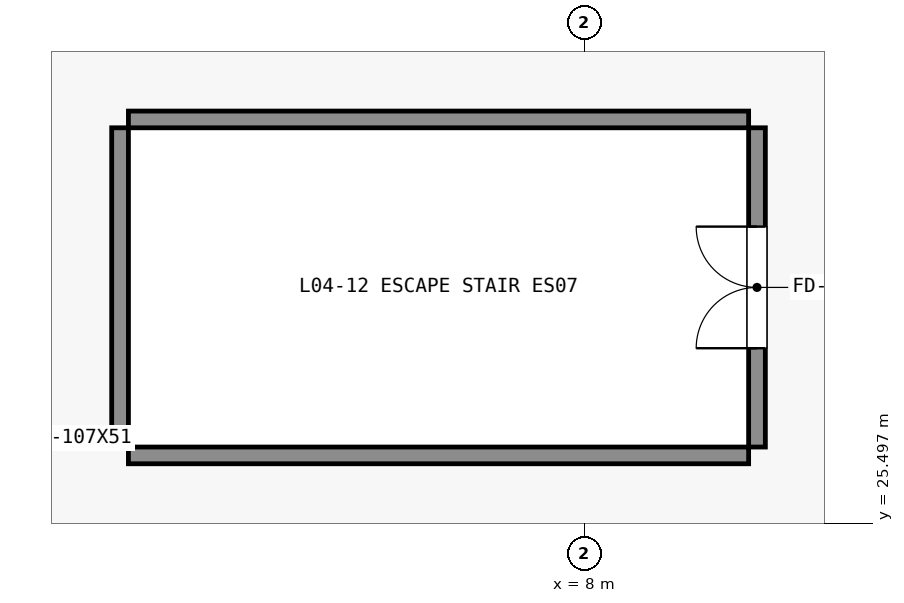
"""IFC4 building model, lengths in metres.
Left out: names, types, materials, properties, quantities, classifications, styles, units other than length and angle.
Written with IfcOpenShell. Run it as: python <this file> out.ifc"""

import sys

from ifc_helpers import new_model, si_unit, direction, frame, frame_2d, origin, place, context, subcontext, project, spatial, rectangle, extrude, element, fill, save


model = new_model("IFC4")
c1 = context("Model", 3, precision=1e-05, world=origin(), true_north=direction((0.0, 1.0)))
c2 = subcontext(c1, "Body", "Model", "MODEL_VIEW")
j1 = project(units=[si_unit("LENGTHUNIT", "METRE"), si_unit("PLANEANGLEUNIT", "RADIAN")], contexts=[c1])
p1 = place(None, origin())
s1 = spatial("IfcSite", under=j1, at=p1, CompositionType="ELEMENT")
p2 = place(p1, origin())
s2 = spatial("IfcBuilding", under=s1, at=p2, CompositionType="ELEMENT")
p3 = place(p2, frame((0.0, 0.0, 21.0)))
s3 = spatial("IfcBuildingStorey", under=s2, at=p3, CompositionType="ELEMENT", Elevation=21.0)
for number, where, z_axis, x_axis in (
    (1, (2.0, 26.39, 0.0), (0.0, 0.0, 1.0), (1.0, 0.0, 0.0)),
    (2, (2.0, 30.81, 0.0), (0.0, 0.0, 1.0), (1.0, 0.0, 0.0)),
):
    element("IfcWall", number, at=place(p3, frame(where, z_axis=z_axis, x_axis=x_axis)), inside=s3, PredefinedType="SHEAR", context=c2, shape_type="SweptSolid", body=[
        extrude(rectangle(XDim=8.16, YDim=0.22, at=frame_2d((4.08, 0.0))), origin(), (0.0, 0.0, 1.0), 5.08),
    ])
p4 = place(p3, frame((1.89, 26.5, 0.0), z_axis=(0.0, 0.0, 1.0), x_axis=(0.0, 1.0, 0.0)))
e3 = element("IfcWall", 3, at=p4, inside=s3, PredefinedType="SHEAR", context=c2, shape_type="SweptSolid", body=[
    extrude(rectangle(XDim=4.2, YDim=0.22, at=frame_2d((2.1, 0.0))), origin(), (0.0, 0.0, 1.0), 5.08),
])
p5 = place(p3, frame((10.27, 26.5, 0.0), z_axis=(0.0, 0.0, 1.0), x_axis=(0.0, 1.0, 0.0)))
e4 = element("IfcWall", 4, at=p5, inside=s3, PredefinedType="SHEAR", context=c2, shape_type="SweptSolid", body=[
    extrude(rectangle(XDim=4.2, YDim=0.22, at=frame_2d((2.1, 0.0))), origin(), (0.0, 0.0, 1.0), 5.08),
])
p6 = place(p5, frame((1.3, 0.0, 0.0)))
e5 = element("IfcOpeningElement", 5, at=p6, cuts=e4, PredefinedType="OPENING", context=c2, shape_type="SweptSolid", body=[
    extrude(rectangle(XDim=1.6, YDim=2.2, at=frame_2d((0.8, 1.1))), frame((0.0, 0.12, 0.0), z_axis=(0.0, -1.0, 0.0), x_axis=(1.0, 0.0, 0.0)), (0.0, 0.0, 1.0), 0.24),
])
p7 = place(p6, origin())
e6 = element("IfcDoor", 6, at=p7, inside=s3, OperationType="DOUBLE_DOOR_SINGLE_SWING", PredefinedType="DOOR", context=c2, shape_type="SweptSolid", body=[
    extrude(rectangle(XDim=1.6, YDim=2.2, at=frame_2d((0.8, 1.1))), frame((0.0, 0.025, 0.0), z_axis=(0.0, -1.0, 0.0), x_axis=(1.0, 0.0, 0.0)), (0.0, 0.0, 1.0), 0.05),
])
fill(e5, e6)
save(model, sys.argv[1])
